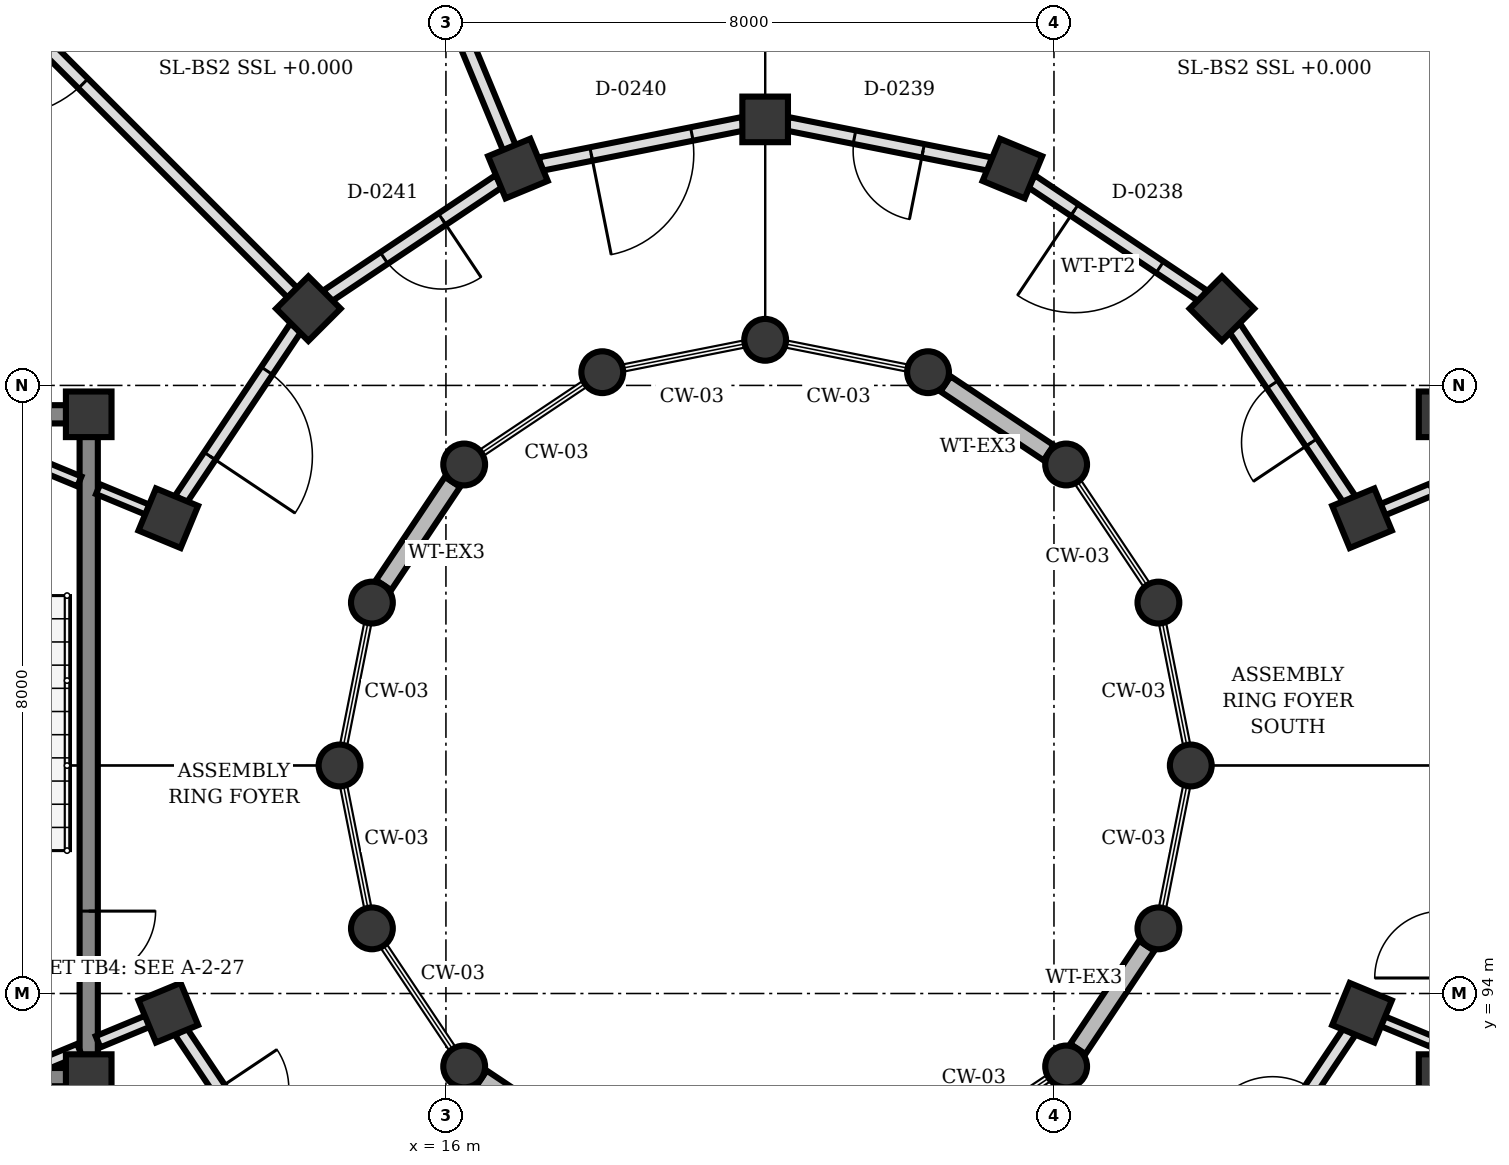
"""IFC4 building model, lengths in metres.
Left out: names, types, materials, properties, quantities, classifications, styles, units other than length and angle.
Written with IfcOpenShell. Run it as: python <this file> out.ifc"""

import sys

from ifc_helpers import new_model, si_unit, direction, frame, frame_2d, origin, origin_2d, place, context, subcontext, project, spatial, rectangle, circle, extrude, element, fill, save


model = new_model("IFC4")
c1 = context("Model", 3, precision=1e-05, world=origin(), true_north=direction((0.0, 1.0)))
c2 = subcontext(c1, "Body", "Model", "MODEL_VIEW")
j1 = project(units=[si_unit("LENGTHUNIT", "METRE"), si_unit("PLANEANGLEUNIT", "RADIAN")], contexts=[c1])
p1 = place(None, origin())
s1 = spatial("IfcSite", under=j1, at=p1, CompositionType="ELEMENT")
p2 = place(p1, origin())
s2 = spatial("IfcBuilding", under=s1, at=p2, CompositionType="ELEMENT")
p3 = place(p2, origin())
s3 = spatial("IfcBuildingStorey", under=s2, at=p3, CompositionType="ELEMENT", Elevation=0.0)
for number, where, z_axis, x_axis in (
    (1, (11.3, 92.9, 0.0), (0.0, 0.0, 1.0), (1.0, 0.0, 0.0)),
    (2, (11.3, 101.62, 0.0), (0.0, 0.0, 1.0), (1.0, 0.0, 0.0)),
    (3, (29.1, 92.9, 0.0), (0.0, 0.0, 1.0), (1.0, 0.0, 0.0)),
    (4, (29.1, 101.62, 0.0), (0.0, 0.0, 1.0), (1.0, 0.0, 0.0)),
):
    element("IfcColumn", number, at=place(p3, frame(where, z_axis=z_axis, x_axis=x_axis)), inside=s3, PredefinedType="COLUMN", context=c2, shape_type="SweptSolid", body=[
        extrude(rectangle(XDim=0.6, YDim=0.6, at=origin_2d()), origin(), (0.0, 0.0, 1.0), 4.5),
    ])
for number, where, z_axis, x_axis in (
    (5, (25.8, 97.0, 0.0), (0.0, 0.0, 1.0), (1.0, 0.0, 0.0)),
    (6, (25.374, 99.143, 0.0), (0.0, 0.0, 1.0), (1.0, 0.0, 0.0)),
    (7, (24.16, 100.96, 0.0), (0.0, 0.0, 1.0), (1.0, 0.0, 0.0)),
    (8, (22.343, 102.174, 0.0), (0.0, 0.0, 1.0), (1.0, 0.0, 0.0)),
    (9, (20.2, 102.6, 0.0), (0.0, 0.0, 1.0), (1.0, 0.0, 0.0)),
    (10, (18.057, 102.174, 0.0), (0.0, 0.0, 1.0), (1.0, 0.0, 0.0)),
    (11, (16.24, 100.96, 0.0), (0.0, 0.0, 1.0), (1.0, 0.0, 0.0)),
    (12, (15.026, 99.143, 0.0), (0.0, 0.0, 1.0), (1.0, 0.0, 0.0)),
    (13, (14.6, 97.0, 0.0), (0.0, 0.0, 1.0), (1.0, 0.0, 0.0)),
    (14, (15.026, 94.857, 0.0), (0.0, 0.0, 1.0), (1.0, 0.0, 0.0)),
    (15, (16.24, 93.04, 0.0), (0.0, 0.0, 1.0), (1.0, 0.0, 0.0)),
    (16, (24.16, 93.04, 0.0), (0.0, 0.0, 1.0), (1.0, 0.0, 0.0)),
    (17, (25.374, 94.857, 0.0), (0.0, 0.0, 1.0), (1.0, 0.0, 0.0)),
):
    element("IfcColumn", number, at=place(p3, frame(where, z_axis=z_axis, x_axis=x_axis)), inside=s3, PredefinedType="COLUMN", context=c2, shape_type="SweptSolid", body=[
        extrude(circle(Radius=0.275, at=origin_2d()), origin(), (0.0, 0.0, 1.0), 4.5),
    ])
for number, where, z_axis, x_axis in (
    (18, (28.053, 100.253, 0.0), (0.0, 0.0, 1.0), (0.924, 0.383, 0.0)),
    (19, (26.21, 103.01, 0.0), (0.0, 0.0, 1.0), (0.707, 0.707, 0.0)),
    (20, (23.453, 104.853, 0.0), (0.0, 0.0, 1.0), (0.383, 0.924, 0.0)),
    (21, (20.2, 105.5, 0.0), (0.0, 0.0, 1.0), (0.0, 1.0, 0.0)),
    (22, (16.947, 104.853, 0.0), (0.0, 0.0, 1.0), (-0.383, 0.924, 0.0)),
    (23, (14.19, 103.01, 0.0), (0.0, 0.0, 1.0), (-0.707, 0.707, 0.0)),
    (24, (12.347, 100.253, 0.0), (0.0, 0.0, 1.0), (-0.924, 0.383, 0.0)),
    (25, (12.347, 93.747, 0.0), (0.0, 0.0, 1.0), (-0.924, -0.383, 0.0)),
    (26, (28.053, 93.747, 0.0), (0.0, 0.0, 1.0), (0.924, -0.383, 0.0)),
):
    element("IfcColumn", number, at=place(p3, frame(where, z_axis=z_axis, x_axis=x_axis)), inside=s3, PredefinedType="COLUMN", context=c2, shape_type="SweptSolid", body=[
        extrude(rectangle(XDim=0.6, YDim=0.6, at=origin_2d()), origin(), (0.0, 0.0, 1.0), 4.5),
    ])
for number, where, z_axis, x_axis in (
    (27, (23.93, 101.114, 0.0), (0.0, 0.0, 1.0), (-0.832, 0.555, 0.0)),
    (28, (16.086, 100.73, 0.0), (0.0, 0.0, 1.0), (-0.555, -0.832, 0.0)),
    (29, (16.47, 92.886, 0.0), (0.0, 0.0, 1.0), (0.832, -0.555, 0.0)),
    (30, (24.314, 93.27, 0.0), (0.0, 0.0, 1.0), (0.555, 0.832, 0.0)),
):
    element("IfcWall", number, at=place(p3, frame(where, z_axis=z_axis, x_axis=x_axis)), inside=s3, PredefinedType="SOLIDWALL", context=c2, shape_type="SweptSolid", body=[
        extrude(rectangle(XDim=1.632, YDim=0.24, at=frame_2d((0.816, 0.0))), origin(), (0.0, 0.0, 1.0), 3.55),
    ])
p4 = place(p3, frame((11.3, 101.328, 0.0), z_axis=(0.0, 0.0, 1.0), x_axis=(0.0, -1.0, 0.0)))
e31 = element("IfcWall", 31, at=p4, inside=s3, PredefinedType="SHEAR", context=c2, shape_type="SweptSolid", body=[
    extrude(rectangle(XDim=8.136, YDim=0.24, at=frame_2d((4.068, 0.0))), origin(), (0.0, 0.0, 1.0), 4.24),
])
p5 = place(p4, frame((6.244, 0.0, 0.0)))
e32 = element("IfcOpeningElement", 32, at=p5, cuts=e31, PredefinedType="OPENING", context=c2, shape_type="SweptSolid", body=[
    extrude(rectangle(XDim=0.88, YDim=2.1, at=frame_2d((0.44, 1.05))), frame((0.0, 0.13, 0.0), z_axis=(0.0, -1.0, 0.0), x_axis=(1.0, 0.0, 0.0)), (0.0, 0.0, 1.0), 0.26),
])
for number, where, z_axis, x_axis in (
    (33, (11.008, 92.9, 0.0), (0.0, 0.0, 1.0), (-1.0, 0.0, 0.0)),
    (34, (11.008, 101.62, 0.0), (0.0, 0.0, 1.0), (-1.0, 0.0, 0.0)),
):
    element("IfcWall", number, at=place(p3, frame(where, z_axis=z_axis, x_axis=x_axis)), inside=s3, PredefinedType="SHEAR", context=c2, shape_type="SweptSolid", body=[
        extrude(rectangle(XDim=4.216, YDim=0.24, at=frame_2d((2.108, 0.0))), origin(), (0.0, 0.0, 1.0), 4.24),
    ])
p6 = place(p3, frame((28.323, 100.364, 0.0), z_axis=(0.0, 0.0, 1.0), x_axis=(0.923840285319, 0.382778169729, 0.0)))
e35 = element("IfcWall", 35, at=p6, inside=s3, PredefinedType="PARTITIONING", context=c2, shape_type="SweptSolid", body=[
    extrude(rectangle(XDim=0.708, YDim=0.16, at=frame_2d((0.354, 0.0))), origin(), (0.0, 0.0, 1.0), 4.2),
])
p7 = place(p3, frame((16.836, 105.123, 0.0), z_axis=(0.0, 0.0, 1.0), x_axis=(-0.382780060664, 0.923839501839, 0.0)))
e36 = element("IfcWall", 36, at=p7, inside=s3, PredefinedType="PARTITIONING", context=c2, shape_type="SweptSolid", body=[
    extrude(rectangle(XDim=8.391, YDim=0.18, at=frame_2d((4.196, 0.0))), origin(), (0.0, 0.0, 1.0), 3.552),
])
p8 = place(p7, frame((3.897, 0.0, 0.0)))
e37 = element("IfcOpeningElement", 37, at=p8, cuts=e36, PredefinedType="OPENING", context=c2, shape_type="SweptSolid", body=[
    extrude(rectangle(XDim=1.45, YDim=2.2, at=frame_2d((0.725, 1.1))), frame((0.0, 0.1, 0.0), z_axis=(0.0, -1.0, 0.0), x_axis=(1.0, 0.0, 0.0)), (0.0, 0.0, 1.0), 0.2),
])
p9 = place(p3, frame((13.984, 103.216, 0.0), z_axis=(0.0, 0.0, 1.0), x_axis=(-0.707106781187, 0.707106781187, 0.0)))
e38 = element("IfcWall", 38, at=p9, inside=s3, PredefinedType="PARTITIONING", context=c2, shape_type="SweptSolid", body=[
    extrude(rectangle(XDim=8.392, YDim=0.18, at=frame_2d((4.196, 0.0))), origin(), (0.0, 0.0, 1.0), 3.552),
])
p10 = place(p9, frame((3.898, 0.0, 0.0)))
e39 = element("IfcOpeningElement", 39, at=p10, cuts=e38, PredefinedType="OPENING", context=c2, shape_type="SweptSolid", body=[
    extrude(rectangle(XDim=1.45, YDim=2.2, at=frame_2d((0.725, 1.1))), frame((0.0, 0.1, 0.0), z_axis=(0.0, -1.0, 0.0), x_axis=(1.0, 0.0, 0.0)), (0.0, 0.0, 1.0), 0.2),
])
p11 = place(p3, frame((12.077, 100.364, 0.0), z_axis=(0.0, 0.0, 1.0), x_axis=(-0.923789734747, 0.382900151445, 0.0)))
e40 = element("IfcWall", 40, at=p11, inside=s3, PredefinedType="PARTITIONING", context=c2, shape_type="SweptSolid", body=[
    extrude(rectangle(XDim=0.708, YDim=0.14, at=frame_2d((0.354, 0.0))), origin(), (0.0, 0.0, 1.0), 4.2),
])
p12 = place(p3, frame((11.177, 100.737, 0.0), z_axis=(0.0, 0.0, 1.0), x_axis=(-0.923817443679, 0.382833293686, 0.0)))
e41 = element("IfcWall", 41, at=p12, inside=s3, PredefinedType="PARTITIONING", context=c2, shape_type="SweptSolid", body=[
    extrude(rectangle(XDim=1.985, YDim=0.14, at=frame_2d((0.993, 0.0))), origin(), (0.0, 0.0, 1.0), 4.2),
])
p13 = place(p3, frame((12.077, 93.636, 0.0), z_axis=(0.0, 0.0, 1.0), x_axis=(-0.923789734747, -0.382900151445, 0.0)))
e42 = element("IfcWall", 42, at=p13, inside=s3, PredefinedType="PARTITIONING", context=c2, shape_type="SweptSolid", body=[
    extrude(rectangle(XDim=0.708, YDim=0.16, at=frame_2d((0.354, 0.0))), origin(), (0.0, 0.0, 1.0), 3.552),
])
p14 = place(p3, frame((11.177, 93.263, 0.0), z_axis=(0.0, 0.0, 1.0), x_axis=(-0.923812676193, -0.382844797933, 0.0)))
e43 = element("IfcWall", 43, at=p14, inside=s3, PredefinedType="PARTITIONING", context=c2, shape_type="SweptSolid", body=[
    extrude(rectangle(XDim=0.627, YDim=0.16, at=frame_2d((0.313, 0.0))), origin(), (0.0, 0.0, 1.0), 3.552),
])
p15 = place(p3, frame((28.323, 93.636, 0.0), z_axis=(0.0, 0.0, 1.0), x_axis=(0.923840285319, -0.382778169729, 0.0)))
e44 = element("IfcWall", 44, at=p15, inside=s3, PredefinedType="PARTITIONING", context=c2, shape_type="SweptSolid", body=[
    extrude(rectangle(XDim=0.708, YDim=0.14, at=frame_2d((0.354, 0.0))), origin(), (0.0, 0.0, 1.0), 3.552),
])
p16 = place(p3, frame((27.888, 100.501, 0.0), z_axis=(0.0, 0.0, 1.0), x_axis=(-0.556128339679, 0.831096426298, 0.0)))
e45 = element("IfcWall", 45, at=p16, inside=s3, PredefinedType="PARTITIONING", context=c2, shape_type="SweptSolid", body=[
    extrude(rectangle(XDim=2.72, YDim=0.18, at=frame_2d((1.36, 0.0))), origin(), (0.0, 0.0, 1.0), 3.552),
])
p17 = place(p16, frame((0.9, 0.0, 0.0)))
e46 = element("IfcOpeningElement", 46, at=p17, cuts=e45, PredefinedType="OPENING", context=c2, shape_type="SweptSolid", body=[
    extrude(rectangle(XDim=0.92, YDim=2.1, at=frame_2d((0.46, 1.05))), frame((0.0, 0.1, 0.0), z_axis=(0.0, -1.0, 0.0), x_axis=(1.0, 0.0, 0.0)), (0.0, 0.0, 1.0), 0.2),
])
p18 = place(p3, frame((25.962, 103.175, 0.0), z_axis=(0.0, 0.0, 1.0), x_axis=(-0.831096426298, 0.556128339679, 0.0)))
e47 = element("IfcWall", 47, at=p18, inside=s3, PredefinedType="PARTITIONING", context=c2, shape_type="SweptSolid", body=[
    extrude(rectangle(XDim=2.72, YDim=0.18, at=frame_2d((1.36, 0.0))), origin(), (0.0, 0.0, 1.0), 3.552),
])
p19 = place(p18, frame((0.685, 0.0, 0.0)))
e48 = element("IfcOpeningElement", 48, at=p19, cuts=e47, PredefinedType="OPENING", context=c2, shape_type="SweptSolid", body=[
    extrude(rectangle(XDim=1.35, YDim=2.2, at=frame_2d((0.675, 1.1))), frame((0.0, 0.1, 0.0), z_axis=(0.0, -1.0, 0.0), x_axis=(1.0, 0.0, 0.0)), (0.0, 0.0, 1.0), 0.2),
])
p20 = place(p3, frame((23.161, 104.911, 0.0), z_axis=(0.0, 0.0, 1.0), x_axis=(-0.980776867939, 0.195132609565, 0.0)))
e49 = element("IfcWall", 49, at=p20, inside=s3, PredefinedType="PARTITIONING", context=c2, shape_type="SweptSolid", body=[
    extrude(rectangle(XDim=2.721, YDim=0.18, at=frame_2d((1.361, 0.0))), origin(), (0.0, 0.0, 1.0), 3.552),
])
p21 = place(p20, frame((0.901, 0.0, 0.0)))
e50 = element("IfcOpeningElement", 50, at=p21, cuts=e49, PredefinedType="OPENING", context=c2, shape_type="SweptSolid", body=[
    extrude(rectangle(XDim=0.92, YDim=2.1, at=frame_2d((0.46, 1.05))), frame((0.0, 0.1, 0.0), z_axis=(0.0, -1.0, 0.0), x_axis=(1.0, 0.0, 0.0)), (0.0, 0.0, 1.0), 0.2),
])
p22 = place(p3, frame((19.908, 105.442, 0.0), z_axis=(0.0, 0.0, 1.0), x_axis=(-0.980776867939, -0.195132609565, 0.0)))
e51 = element("IfcWall", 51, at=p22, inside=s3, PredefinedType="PARTITIONING", context=c2, shape_type="SweptSolid", body=[
    extrude(rectangle(XDim=2.721, YDim=0.18, at=frame_2d((1.361, 0.0))), origin(), (0.0, 0.0, 1.0), 3.552),
])
p23 = place(p22, frame((0.686, 0.0, 0.0)))
e52 = element("IfcOpeningElement", 52, at=p23, cuts=e51, PredefinedType="OPENING", context=c2, shape_type="SweptSolid", body=[
    extrude(rectangle(XDim=1.35, YDim=2.2, at=frame_2d((0.675, 1.1))), frame((0.0, 0.1, 0.0), z_axis=(0.0, -1.0, 0.0), x_axis=(1.0, 0.0, 0.0)), (0.0, 0.0, 1.0), 0.2),
])
p24 = place(p3, frame((16.699, 104.688, 0.0), z_axis=(0.0, 0.0, 1.0), x_axis=(-0.831096426298, -0.556128339679, 0.0)))
e53 = element("IfcWall", 53, at=p24, inside=s3, PredefinedType="PARTITIONING", context=c2, shape_type="SweptSolid", body=[
    extrude(rectangle(XDim=2.72, YDim=0.18, at=frame_2d((1.36, 0.0))), origin(), (0.0, 0.0, 1.0), 3.552),
])
p25 = place(p24, frame((0.9, 0.0, 0.0)))
e54 = element("IfcOpeningElement", 54, at=p25, cuts=e53, PredefinedType="OPENING", context=c2, shape_type="SweptSolid", body=[
    extrude(rectangle(XDim=0.92, YDim=2.1, at=frame_2d((0.46, 1.05))), frame((0.0, 0.1, 0.0), z_axis=(0.0, -1.0, 0.0), x_axis=(1.0, 0.0, 0.0)), (0.0, 0.0, 1.0), 0.2),
])
p26 = place(p3, frame((14.025, 102.762, 0.0), z_axis=(0.0, 0.0, 1.0), x_axis=(-0.556128339679, -0.831096426298, 0.0)))
e55 = element("IfcWall", 55, at=p26, inside=s3, PredefinedType="PARTITIONING", context=c2, shape_type="SweptSolid", body=[
    extrude(rectangle(XDim=2.72, YDim=0.18, at=frame_2d((1.36, 0.0))), origin(), (0.0, 0.0, 1.0), 3.552),
])
p27 = place(p26, frame((0.685, 0.0, 0.0)))
e56 = element("IfcOpeningElement", 56, at=p27, cuts=e55, PredefinedType="OPENING", context=c2, shape_type="SweptSolid", body=[
    extrude(rectangle(XDim=1.35, YDim=2.2, at=frame_2d((0.675, 1.1))), frame((0.0, 0.1, 0.0), z_axis=(0.0, -1.0, 0.0), x_axis=(1.0, 0.0, 0.0)), (0.0, 0.0, 1.0), 0.2),
])
p28 = place(p3, frame((12.512, 93.499, 0.0), z_axis=(0.0, 0.0, 1.0), x_axis=(0.556128339679, -0.831096426298, 0.0)))
e57 = element("IfcWall", 57, at=p28, inside=s3, PredefinedType="PARTITIONING", context=c2, shape_type="SweptSolid", body=[
    extrude(rectangle(XDim=2.72, YDim=0.18, at=frame_2d((1.36, 0.0))), origin(), (0.0, 0.0, 1.0), 3.552),
])
p29 = place(p28, frame((0.9, 0.0, 0.0)))
e58 = element("IfcOpeningElement", 58, at=p29, cuts=e57, PredefinedType="OPENING", context=c2, shape_type="SweptSolid", body=[
    extrude(rectangle(XDim=0.92, YDim=2.1, at=frame_2d((0.46, 1.05))), frame((0.0, 0.1, 0.0), z_axis=(0.0, -1.0, 0.0), x_axis=(1.0, 0.0, 0.0)), (0.0, 0.0, 1.0), 0.2),
])
p30 = place(p3, frame((26.375, 91.238, 0.0), z_axis=(0.0, 0.0, 1.0), x_axis=(0.556128339679, 0.831096426298, 0.0)))
e59 = element("IfcWall", 59, at=p30, inside=s3, PredefinedType="PARTITIONING", context=c2, shape_type="SweptSolid", body=[
    extrude(rectangle(XDim=2.72, YDim=0.18, at=frame_2d((1.36, 0.0))), origin(), (0.0, 0.0, 1.0), 3.552),
])
p31 = place(p30, frame((0.9, 0.0, 0.0)))
e60 = element("IfcOpeningElement", 60, at=p31, cuts=e59, PredefinedType="OPENING", context=c2, shape_type="SweptSolid", body=[
    extrude(rectangle(XDim=0.92, YDim=2.1, at=frame_2d((0.46, 1.05))), frame((0.0, 0.1, 0.0), z_axis=(0.0, -1.0, 0.0), x_axis=(1.0, 0.0, 0.0)), (0.0, 0.0, 1.0), 0.2),
])
p32 = place(p5, origin())
e61 = element("IfcDoor", 61, at=p32, inside=s3, OperationType="SINGLE_SWING_LEFT", PredefinedType="DOOR", context=c2, shape_type="SweptSolid", body=[
    extrude(rectangle(XDim=0.88, YDim=2.1, at=frame_2d((0.44, 1.05))), frame((0.0, 0.025, 0.0), z_axis=(0.0, -1.0, 0.0), x_axis=(1.0, 0.0, 0.0)), (0.0, 0.0, 1.0), 0.05),
])
fill(e32, e61)
p33 = place(p10, origin())
e62 = element("IfcDoor", 62, at=p33, inside=s3, OperationType="SINGLE_SWING_RIGHT", PredefinedType="DOOR", context=c2, shape_type="SweptSolid", body=[
    extrude(rectangle(XDim=1.45, YDim=2.2, at=frame_2d((0.725, 1.1))), frame((0.0, 0.025, 0.0), z_axis=(0.0, -1.0, 0.0), x_axis=(1.0, 0.0, 0.0)), (0.0, 0.0, 1.0), 0.05),
])
fill(e39, e62)
p34 = place(p17, origin())
e63 = element("IfcDoor", 63, at=p34, inside=s3, OperationType="SINGLE_SWING_LEFT", PredefinedType="DOOR", context=c2, shape_type="SweptSolid", body=[
    extrude(rectangle(XDim=0.92, YDim=2.1, at=frame_2d((0.46, 1.05))), frame((0.0, 0.025, 0.0), z_axis=(0.0, -1.0, 0.0), x_axis=(1.0, 0.0, 0.0)), (0.0, 0.0, 1.0), 0.05),
])
fill(e46, e63)
p35 = place(p19, origin())
e64 = element("IfcDoor", 64, at=p35, inside=s3, OperationType="SINGLE_SWING_RIGHT", PredefinedType="DOOR", context=c2, shape_type="SweptSolid", body=[
    extrude(rectangle(XDim=1.35, YDim=2.2, at=frame_2d((0.675, 1.1))), frame((0.0, 0.025, 0.0), z_axis=(0.0, -1.0, 0.0), x_axis=(1.0, 0.0, 0.0)), (0.0, 0.0, 1.0), 0.05),
])
fill(e48, e64)
p36 = place(p21, origin())
e65 = element("IfcDoor", 65, at=p36, inside=s3, OperationType="SINGLE_SWING_LEFT", PredefinedType="DOOR", context=c2, shape_type="SweptSolid", body=[
    extrude(rectangle(XDim=0.92, YDim=2.1, at=frame_2d((0.46, 1.05))), frame((0.0, 0.025, 0.0), z_axis=(0.0, -1.0, 0.0), x_axis=(1.0, 0.0, 0.0)), (0.0, 0.0, 1.0), 0.05),
])
fill(e50, e65)
p37 = place(p23, origin())
e66 = element("IfcDoor", 66, at=p37, inside=s3, OperationType="SINGLE_SWING_RIGHT", PredefinedType="DOOR", context=c2, shape_type="SweptSolid", body=[
    extrude(rectangle(XDim=1.35, YDim=2.2, at=frame_2d((0.675, 1.1))), frame((0.0, 0.025, 0.0), z_axis=(0.0, -1.0, 0.0), x_axis=(1.0, 0.0, 0.0)), (0.0, 0.0, 1.0), 0.05),
])
fill(e52, e66)
p38 = place(p25, origin())
e67 = element("IfcDoor", 67, at=p38, inside=s3, OperationType="SINGLE_SWING_LEFT", PredefinedType="DOOR", context=c2, shape_type="SweptSolid", body=[
    extrude(rectangle(XDim=0.92, YDim=2.1, at=frame_2d((0.46, 1.05))), frame((0.0, 0.025, 0.0), z_axis=(0.0, -1.0, 0.0), x_axis=(1.0, 0.0, 0.0)), (0.0, 0.0, 1.0), 0.05),
])
fill(e54, e67)
p39 = place(p27, origin())
e68 = element("IfcDoor", 68, at=p39, inside=s3, OperationType="SINGLE_SWING_RIGHT", PredefinedType="DOOR", context=c2, shape_type="SweptSolid", body=[
    extrude(rectangle(XDim=1.35, YDim=2.2, at=frame_2d((0.675, 1.1))), frame((0.0, 0.025, 0.0), z_axis=(0.0, -1.0, 0.0), x_axis=(1.0, 0.0, 0.0)), (0.0, 0.0, 1.0), 0.05),
])
fill(e56, e68)
save(model, sys.argv[1])
